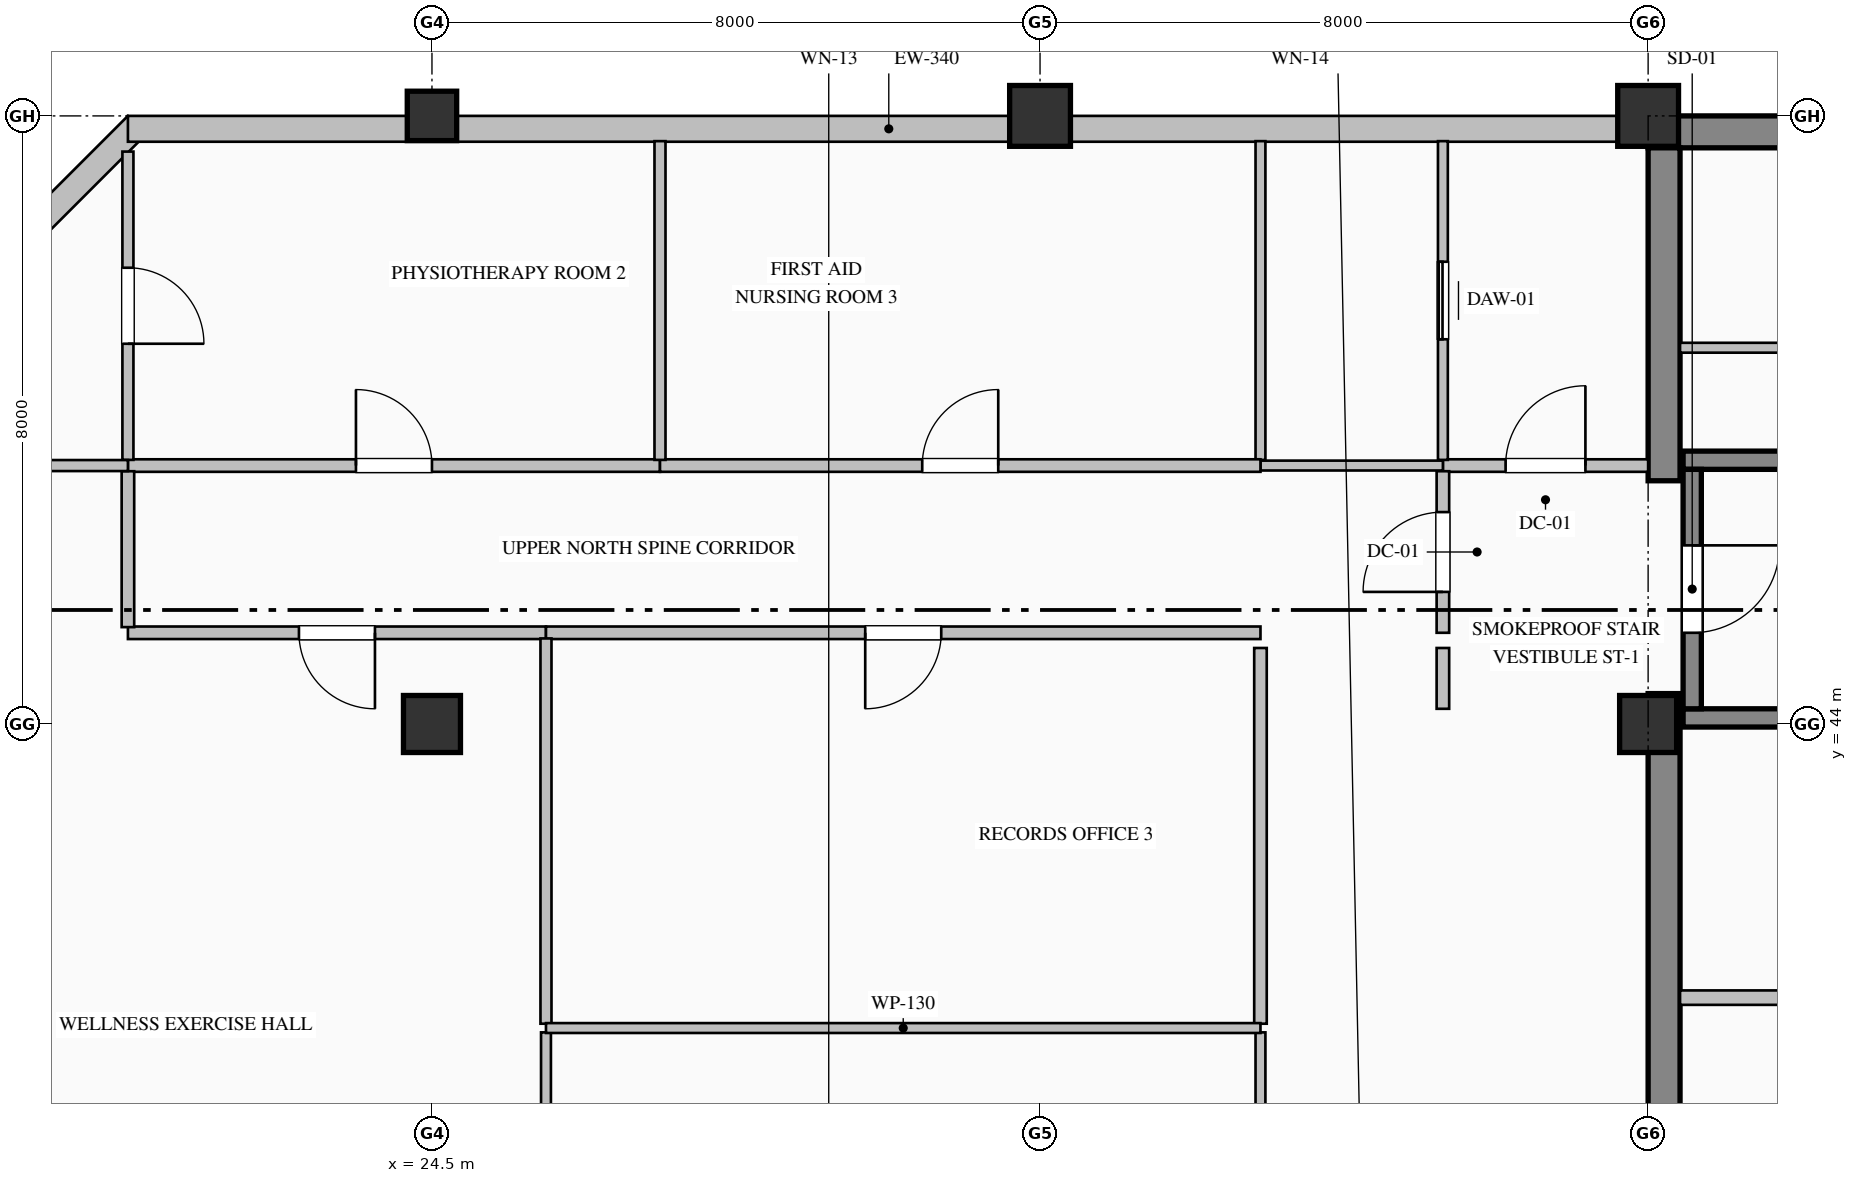
"""IFC4 building model, lengths in metres.
Left out: names, types, materials, properties, quantities, classifications, styles, units other than length and angle.
Written with IfcOpenShell. Run it as: python <this file> out.ifc"""

import sys

from ifc_helpers import new_model, si_unit, direction, frame, frame_2d, origin, origin_2d, place, context, subcontext, project, spatial, rectangle, hollow_rectangle, extrude, element, fill, save


model = new_model("IFC4")
c1 = context("Model", 3, precision=1e-05, world=origin(), true_north=direction((0.0, 1.0)))
c2 = subcontext(c1, "Body", "Model", "MODEL_VIEW")
j1 = project(units=[si_unit("LENGTHUNIT", "METRE"), si_unit("PLANEANGLEUNIT", "RADIAN")], contexts=[c1])
p1 = place(None, origin())
s1 = spatial("IfcSite", under=j1, at=p1, CompositionType="ELEMENT")
p2 = place(p1, origin())
s2 = spatial("IfcBuilding", under=s1, at=p2, CompositionType="ELEMENT")
p3 = place(p2, frame((0.0, 0.0, 347.2)))
s3 = spatial("IfcBuildingStorey", under=s2, at=p3, CompositionType="ELEMENT", Elevation=347.2)
p4 = place(p3, frame((40.5, 51.79, 0.0), z_axis=(0.0, 0.0, 1.0), x_axis=(1.0, 0.0, 0.0)))
e1 = element("IfcWall", 1, at=p4, inside=s3, PredefinedType="SHEAR", context=c2, shape_type="SweptSolid", body=[
    extrude(rectangle(XDim=23.5, YDim=0.42, at=frame_2d((11.75, 0.0))), origin(), (0.0, 0.0, 1.0), 3.785),
])
p5 = place(p3, frame((40.71, 36.42, 0.0), z_axis=(0.0, 0.0, 1.0), x_axis=(0.0, 1.0, 0.0)))
e2 = element("IfcWall", 2, at=p5, inside=s3, PredefinedType="SHEAR", context=c2, shape_type="SweptSolid", body=[
    extrude(rectangle(XDim=7.98, YDim=0.42, at=frame_2d((3.99, 0.0))), origin(), (0.0, 0.0, 1.0), 3.785),
])
p6 = place(p3, frame((40.71, 47.2, 0.0), z_axis=(0.0, 0.0, 1.0), x_axis=(0.0, 1.0, 0.0)))
e3 = element("IfcWall", 3, at=p6, inside=s3, PredefinedType="SHEAR", context=c2, shape_type="SweptSolid", body=[
    extrude(rectangle(XDim=4.38, YDim=0.42, at=frame_2d((2.19, 0.0))), origin(), (0.0, 0.0, 1.0), 3.785),
])
p7 = place(p3, frame((24.5, 44.0, 0.0), z_axis=(0.0, 0.0, 1.0), x_axis=(1.0, 0.0, 0.0)))
e4 = element("IfcColumn", 4, at=p7, inside=s3, PredefinedType="COLUMN", context=c2, shape_type="SweptSolid", body=[
    extrude(rectangle(XDim=0.75, YDim=0.75, at=origin_2d()), origin(), (0.0, 0.0, 1.0), 4.0),
])
p8 = place(p3, frame((24.5, 52.0, 0.0), z_axis=(0.0, 0.0, 1.0), x_axis=(1.0, 0.0, 0.0)))
e5 = element("IfcColumn", 5, at=p8, inside=s3, PredefinedType="COLUMN", context=c2, shape_type="SweptSolid", body=[
    extrude(hollow_rectangle(XDim=0.65, YDim=0.65, WallThickness=0.028, at=origin_2d()), origin(), (0.0, 0.0, 1.0), 4.0),
])
p9 = place(p3, frame((32.5, 52.0, 0.0), z_axis=(0.0, 0.0, 1.0), x_axis=(1.0, 0.0, 0.0)))
e6 = element("IfcColumn", 6, at=p9, inside=s3, PredefinedType="COLUMN", context=c2, shape_type="SweptSolid", body=[
    extrude(hollow_rectangle(XDim=0.8, YDim=0.8, WallThickness=0.032, at=origin_2d()), origin(), (0.0, 0.0, 1.0), 4.0),
])
p10 = place(p3, frame((40.5, 44.0, 0.0), z_axis=(0.0, 0.0, 1.0), x_axis=(1.0, 0.0, 0.0)))
e7 = element("IfcColumn", 7, at=p10, inside=s3, PredefinedType="COLUMN", context=c2, shape_type="SweptSolid", body=[
    extrude(rectangle(XDim=0.75, YDim=0.75, at=origin_2d()), origin(), (0.0, 0.0, 1.0), 4.0),
])
p11 = place(p3, frame((40.5, 52.0, 0.0), z_axis=(0.0, 0.0, 1.0), x_axis=(1.0, 0.0, 0.0)))
e8 = element("IfcColumn", 8, at=p11, inside=s3, PredefinedType="COLUMN", context=c2, shape_type="SweptSolid", body=[
    extrude(hollow_rectangle(XDim=0.8, YDim=0.8, WallThickness=0.032, at=origin_2d()), origin(), (0.0, 0.0, 1.0), 4.0),
])
p12 = place(p3, frame((16.62, 47.88, 0.0), z_axis=(0.0, 0.0, 1.0), x_axis=(0.707106781187, 0.707106781187, 0.0)))
e9 = element("IfcWall", 9, at=p12, inside=s3, PredefinedType="SOLIDWALL", context=c2, shape_type="SweptSolid", body=[
    extrude(rectangle(XDim=5.657, YDim=0.34, at=frame_2d((2.828, 0.0))), origin(), (0.0, 0.0, 1.0), 3.785),
])
p13 = place(p3, frame((20.5, 51.83, 0.0), z_axis=(0.0, 0.0, 1.0), x_axis=(1.0, 0.0, 0.0)))
e10 = element("IfcWall", 10, at=p13, inside=s3, PredefinedType="SOLIDWALL", context=c2, shape_type="SweptSolid", body=[
    extrude(rectangle(XDim=20.02, YDim=0.34, at=frame_2d((10.01, 0.0))), origin(), (0.0, 0.0, 1.0), 3.335),
])
for number, where, z_axis, x_axis in (
    (11, (40.96, 47.47, 0.0), (0.0, 0.0, 1.0), (1.0, 0.0, 0.0)),
    (12, (49.04, 44.08, 0.0), (0.0, 0.0, 1.0), (-1.0, 0.0, 0.0)),
):
    element("IfcWall", number, at=place(p3, frame(where, z_axis=z_axis, x_axis=x_axis)), inside=s3, PredefinedType="SOLIDWALL", context=c2, shape_type="SweptSolid", body=[
        extrude(rectangle(XDim=8.08, YDim=0.24, at=frame_2d((4.04, 0.0))), origin(), (0.0, 0.0, 1.0), 4.0),
    ])
p14 = place(p3, frame((41.08, 47.35, 0.0), z_axis=(0.0, 0.0, 1.0), x_axis=(0.0, -1.0, 0.0)))
e13 = element("IfcWall", 13, at=p14, inside=s3, PredefinedType="SOLIDWALL", context=c2, shape_type="SweptSolid", body=[
    extrude(rectangle(XDim=3.15, YDim=0.24, at=frame_2d((1.575, 0.0))), origin(), (0.0, 0.0, 1.0), 4.0),
])
p15 = place(p14, frame((1.0, 0.0, 0.0)))
e14 = element("IfcOpeningElement", 14, at=p15, cuts=e13, PredefinedType="OPENING", context=c2, shape_type="SweptSolid", body=[
    extrude(rectangle(XDim=1.15, YDim=2.2, at=frame_2d((0.575, 1.1))), frame((0.0, 0.13, 0.0), z_axis=(0.0, -1.0, 0.0), x_axis=(1.0, 0.0, 0.0)), (0.0, 0.0, 1.0), 0.26),
])
p16 = place(p3, frame((37.8, 47.4, 0.0), z_axis=(0.0, 0.0, 1.0), x_axis=(1.0, 0.0, 0.0)))
e15 = element("IfcWall", 15, at=p16, inside=s3, PredefinedType="PARTITIONING", context=c2, shape_type="SweptSolid", body=[
    extrude(rectangle(XDim=2.7, YDim=0.165, at=frame_2d((1.35, 0.0))), origin(), (0.0, 0.0, 1.0), 3.785),
])
p17 = place(p16, frame((0.825, 0.0, 0.0)))
e16 = element("IfcOpeningElement", 16, at=p17, cuts=e15, PredefinedType="OPENING", context=c2, shape_type="SweptSolid", body=[
    extrude(rectangle(XDim=1.05, YDim=2.15, at=frame_2d((0.525, 1.075))), frame((0.0, 0.093, 0.0), z_axis=(0.0, -1.0, 0.0), x_axis=(1.0, 0.0, 0.0)), (0.0, 0.0, 1.0), 0.185),
])
p18 = place(p3, frame((37.8, 45.2, 0.0), z_axis=(0.0, 0.0, 1.0), x_axis=(0.0, 1.0, 0.0)))
e17 = element("IfcWall", 17, at=p18, inside=s3, PredefinedType="PARTITIONING", context=c2, shape_type="SweptSolid", body=[
    extrude(rectangle(XDim=2.125, YDim=0.165, at=frame_2d((1.063, 0.0))), origin(), (0.0, 0.0, 1.0), 3.785),
])
p19 = place(p18, frame((0.538, 0.0, 0.0)))
e18 = element("IfcOpeningElement", 18, at=p19, cuts=e17, PredefinedType="OPENING", context=c2, shape_type="SweptSolid", body=[
    extrude(rectangle(XDim=1.05, YDim=2.15, at=frame_2d((0.525, 1.075))), frame((0.0, 0.093, 0.0), z_axis=(0.0, -1.0, 0.0), x_axis=(1.0, 0.0, 0.0)), (0.0, 0.0, 1.0), 0.185),
])
p20 = place(p3, frame((37.8, 44.2, 0.0), z_axis=(0.0, 0.0, 1.0), x_axis=(0.0, 1.0, 0.0)))
e19 = element("IfcWall", 19, at=p20, inside=s3, PredefinedType="PARTITIONING", context=c2, shape_type="SweptSolid", body=[
    extrude(rectangle(XDim=0.8, YDim=0.165, at=frame_2d((0.4, 0.0))), origin(), (0.0, 0.0, 1.0), 3.785),
])
p21 = place(p3, frame((37.8, 47.475, 0.0), z_axis=(0.0, 0.0, 1.0), x_axis=(0.0, 1.0, 0.0)))
e20 = element("IfcWall", 20, at=p21, inside=s3, PredefinedType="PARTITIONING", context=c2, shape_type="SweptSolid", body=[
    extrude(rectangle(XDim=4.193, YDim=0.13, at=frame_2d((2.097, 0.0))), origin(), (0.0, 0.0, 1.0), 3.785),
])
p22 = place(p21, frame((1.587, 0.0, 0.0)))
e21 = element("IfcOpeningElement", 21, at=p22, cuts=e20, PredefinedType="OPENING", context=c2, shape_type="SweptSolid", body=[
    extrude(rectangle(XDim=1.02, YDim=2.15, at=frame_2d((0.51, 1.075))), frame((0.0, 0.075, 0.0), z_axis=(0.0, -1.0, 0.0), x_axis=(1.0, 0.0, 0.0)), (0.0, 0.0, 1.0), 0.15),
])
p23 = place(p3, frame((37.8, 47.4, 0.0), z_axis=(0.0, 0.0, 1.0), x_axis=(-1.0, 0.0, 0.0)))
e22 = element("IfcWall", 22, at=p23, inside=s3, PredefinedType="PARTITIONING", context=c2, shape_type="SweptSolid", body=[
    extrude(rectangle(XDim=2.4, YDim=0.13, at=frame_2d((1.2, 0.0))), origin(), (0.0, 0.0, 1.0), 3.785),
])
p24 = place(p3, frame((35.4, 47.475, 0.0), z_axis=(0.0, 0.0, 1.0), x_axis=(0.0, 1.0, 0.0)))
e23 = element("IfcWall", 23, at=p24, inside=s3, PredefinedType="PARTITIONING", context=c2, shape_type="SweptSolid", body=[
    extrude(rectangle(XDim=4.193, YDim=0.13, at=frame_2d((2.097, 0.0))), origin(), (0.0, 0.0, 1.0), 3.785),
])
p25 = place(p3, frame((40.92, 48.95, 0.0), z_axis=(0.0, 0.0, 1.0), x_axis=(1.0, 0.0, 0.0)))
e24 = element("IfcWall", 24, at=p25, inside=s3, PredefinedType="PARTITIONING", context=c2, shape_type="SweptSolid", body=[
    extrude(rectangle(XDim=4.28, YDim=0.13, at=frame_2d((2.14, 0.0))), origin(), (0.0, 0.0, 1.0), 3.785),
])
p26 = place(p25, frame((1.68, 0.0, 0.0)))
e25 = element("IfcOpeningElement", 25, at=p26, cuts=e24, PredefinedType="OPENING", context=c2, shape_type="SweptSolid", body=[
    extrude(rectangle(XDim=0.92, YDim=2.15, at=frame_2d((0.46, 1.075))), frame((0.0, 0.075, 0.0), z_axis=(0.0, -1.0, 0.0), x_axis=(1.0, 0.0, 0.0)), (0.0, 0.0, 1.0), 0.15),
])
p27 = place(p3, frame((40.92, 40.4, 0.0), z_axis=(0.0, 0.0, 1.0), x_axis=(1.0, 0.0, 0.0)))
e26 = element("IfcWall", 26, at=p27, inside=s3, PredefinedType="PARTITIONING", context=c2, shape_type="SweptSolid", body=[
    extrude(rectangle(XDim=8.48, YDim=0.19, at=frame_2d((4.24, 0.0))), origin(), (0.0, 0.0, 1.0), 3.785),
])
p28 = place(p3, frame((20.5, 47.4, 0.0), z_axis=(0.0, 0.0, 1.0), x_axis=(1.0, 0.0, 0.0)))
e27 = element("IfcWall", 27, at=p28, inside=s3, PredefinedType="PARTITIONING", context=c2, shape_type="SweptSolid", body=[
    extrude(rectangle(XDim=7.0, YDim=0.165, at=frame_2d((3.5, 0.0))), origin(), (0.0, 0.0, 1.0), 3.785),
])
p29 = place(p28, frame((3.0, 0.0, 0.0)))
e28 = element("IfcOpeningElement", 28, at=p29, cuts=e27, PredefinedType="OPENING", context=c2, shape_type="SweptSolid", body=[
    extrude(rectangle(XDim=1.0, YDim=2.15, at=frame_2d((0.5, 1.075))), frame((0.0, 0.093, 0.0), z_axis=(0.0, -1.0, 0.0), x_axis=(1.0, 0.0, 0.0)), (0.0, 0.0, 1.0), 0.185),
])
p30 = place(p3, frame((27.5, 47.4, 0.0), z_axis=(0.0, 0.0, 1.0), x_axis=(1.0, 0.0, 0.0)))
e29 = element("IfcWall", 29, at=p30, inside=s3, PredefinedType="PARTITIONING", context=c2, shape_type="SweptSolid", body=[
    extrude(rectangle(XDim=7.9, YDim=0.165, at=frame_2d((3.95, 0.0))), origin(), (0.0, 0.0, 1.0), 3.785),
])
p31 = place(p30, frame((3.45, 0.0, 0.0)))
e30 = element("IfcOpeningElement", 30, at=p31, cuts=e29, PredefinedType="OPENING", context=c2, shape_type="SweptSolid", body=[
    extrude(rectangle(XDim=1.0, YDim=2.15, at=frame_2d((0.5, 1.075))), frame((0.0, 0.093, 0.0), z_axis=(0.0, -1.0, 0.0), x_axis=(1.0, 0.0, 0.0)), (0.0, 0.0, 1.0), 0.185),
])
p32 = place(p3, frame((26.0, 45.2, 0.0), z_axis=(0.0, 0.0, 1.0), x_axis=(-1.0, 0.0, 0.0)))
e31 = element("IfcWall", 31, at=p32, inside=s3, PredefinedType="PARTITIONING", context=c2, shape_type="SweptSolid", body=[
    extrude(rectangle(XDim=5.5, YDim=0.165, at=frame_2d((2.75, 0.0))), origin(), (0.0, 0.0, 1.0), 3.785),
])
p33 = place(p32, frame((2.25, 0.0, 0.0)))
e32 = element("IfcOpeningElement", 32, at=p33, cuts=e31, PredefinedType="OPENING", context=c2, shape_type="SweptSolid", body=[
    extrude(rectangle(XDim=1.0, YDim=2.15, at=frame_2d((0.5, 1.075))), frame((0.0, 0.093, 0.0), z_axis=(0.0, -1.0, 0.0), x_axis=(1.0, 0.0, 0.0)), (0.0, 0.0, 1.0), 0.185),
])
p34 = place(p3, frame((20.5, 45.274, 0.0), z_axis=(0.0, 0.0, 1.0), x_axis=(0.0, 1.0, 0.0)))
e33 = element("IfcWall", 33, at=p34, inside=s3, PredefinedType="PARTITIONING", context=c2, shape_type="SweptSolid", body=[
    extrude(rectangle(XDim=2.051, YDim=0.165, at=frame_2d((1.025, 0.0))), origin(), (0.0, 0.0, 1.0), 3.785),
])
p35 = place(p3, frame((35.4, 45.2, 0.0), z_axis=(0.0, 0.0, 1.0), x_axis=(-1.0, 0.0, 0.0)))
e34 = element("IfcWall", 34, at=p35, inside=s3, PredefinedType="PARTITIONING", context=c2, shape_type="SweptSolid", body=[
    extrude(rectangle(XDim=9.4, YDim=0.165, at=frame_2d((4.7, 0.0))), origin(), (0.0, 0.0, 1.0), 3.785),
])
p36 = place(p35, frame((4.2, 0.0, 0.0)))
e35 = element("IfcOpeningElement", 35, at=p36, cuts=e34, PredefinedType="OPENING", context=c2, shape_type="SweptSolid", body=[
    extrude(rectangle(XDim=1.0, YDim=2.15, at=frame_2d((0.5, 1.075))), frame((0.0, 0.093, 0.0), z_axis=(0.0, -1.0, 0.0), x_axis=(1.0, 0.0, 0.0)), (0.0, 0.0, 1.0), 0.185),
])
p37 = place(p3, frame((35.4, 34.057, 0.0), z_axis=(0.0, 0.0, 1.0), x_axis=(0.0, 1.0, 0.0)))
e36 = element("IfcWall", 36, at=p37, inside=s3, PredefinedType="PARTITIONING", context=c2, shape_type="SweptSolid", body=[
    extrude(rectangle(XDim=5.886, YDim=0.13, at=frame_2d((2.943, 0.0))), origin(), (0.0, 0.0, 1.0), 3.785),
])
p38 = place(p37, frame((2.443, 0.0, 0.0)))
e37 = element("IfcOpeningElement", 37, at=p38, cuts=e36, PredefinedType="OPENING", context=c2, shape_type="SweptSolid", body=[
    extrude(rectangle(XDim=1.0, YDim=2.15, at=frame_2d((0.5, 1.075))), frame((0.0, 0.075, 0.0), z_axis=(0.0, -1.0, 0.0), x_axis=(1.0, 0.0, 0.0)), (0.0, 0.0, 1.0), 0.15),
])
p39 = place(p3, frame((35.4, 40.057, 0.0), z_axis=(0.0, 0.0, 1.0), x_axis=(0.0, 1.0, 0.0)))
e38 = element("IfcWall", 38, at=p39, inside=s3, PredefinedType="PARTITIONING", context=c2, shape_type="SweptSolid", body=[
    extrude(rectangle(XDim=4.943, YDim=0.165, at=frame_2d((2.472, 0.0))), origin(), (0.0, 0.0, 1.0), 3.785),
])
p40 = place(p3, frame((20.5, 51.531, 0.0), z_axis=(0.0, 0.0, 1.0), x_axis=(0.0, -1.0, 0.0)))
e39 = element("IfcWall", 39, at=p40, inside=s3, PredefinedType="PARTITIONING", context=c2, shape_type="SweptSolid", body=[
    extrude(rectangle(XDim=4.056, YDim=0.145, at=frame_2d((2.028, 0.0))), origin(), (0.0, 0.0, 1.0), 3.785),
])
p41 = place(p40, frame((1.528, 0.0, 0.0)))
e40 = element("IfcOpeningElement", 40, at=p41, cuts=e39, PredefinedType="OPENING", context=c2, shape_type="SweptSolid", body=[
    extrude(rectangle(XDim=1.0, YDim=2.15, at=frame_2d((0.5, 1.075))), frame((0.0, 0.083, 0.0), z_axis=(0.0, -1.0, 0.0), x_axis=(1.0, 0.0, 0.0)), (0.0, 0.0, 1.0), 0.165),
])
p42 = place(p3, frame((20.5, 47.4, 0.0), z_axis=(0.0, 0.0, 1.0), x_axis=(-1.0, 0.0, 0.0)))
e41 = element("IfcWall", 41, at=p42, inside=s3, PredefinedType="PARTITIONING", context=c2, shape_type="SweptSolid", body=[
    extrude(rectangle(XDim=3.668, YDim=0.145, at=frame_2d((1.834, 0.0))), origin(), (0.0, 0.0, 1.0), 3.785),
])
p43 = place(p3, frame((27.5, 51.668, 0.0), z_axis=(0.0, 0.0, 1.0), x_axis=(0.0, -1.0, 0.0)))
e42 = element("IfcWall", 42, at=p43, inside=s3, PredefinedType="PARTITIONING", context=c2, shape_type="SweptSolid", body=[
    extrude(rectangle(XDim=4.193, YDim=0.145, at=frame_2d((2.097, 0.0))), origin(), (0.0, 0.0, 1.0), 3.785),
])
p44 = place(p3, frame((26.0, 39.943, 0.0), z_axis=(0.0, 0.0, 1.0), x_axis=(0.0, -1.0, 0.0)))
e43 = element("IfcWall", 43, at=p44, inside=s3, PredefinedType="PARTITIONING", context=c2, shape_type="SweptSolid", body=[
    extrude(rectangle(XDim=5.886, YDim=0.13, at=frame_2d((2.943, 0.0))), origin(), (0.0, 0.0, 1.0), 3.785),
])
p45 = place(p3, frame((26.0, 45.125, 0.0), z_axis=(0.0, 0.0, 1.0), x_axis=(0.0, -1.0, 0.0)))
e44 = element("IfcWall", 44, at=p45, inside=s3, PredefinedType="PARTITIONING", context=c2, shape_type="SweptSolid", body=[
    extrude(rectangle(XDim=5.069, YDim=0.145, at=frame_2d((2.534, 0.0))), origin(), (0.0, 0.0, 1.0), 3.785),
])
p46 = place(p3, frame((26.0, 40.0, 0.0), z_axis=(0.0, 0.0, 1.0), x_axis=(1.0, 0.0, 0.0)))
e45 = element("IfcWall", 45, at=p46, inside=s3, PredefinedType="PARTITIONING", context=c2, shape_type="SweptSolid", body=[
    extrude(rectangle(XDim=9.4, YDim=0.13, at=frame_2d((4.7, 0.0))), origin(), (0.0, 0.0, 1.0), 3.785),
])
p47 = place(p15, origin())
e46 = element("IfcDoor", 46, at=p47, inside=s3, OperationType="SINGLE_SWING_LEFT", PredefinedType="DOOR", context=c2, shape_type="SweptSolid", body=[
    extrude(rectangle(XDim=1.15, YDim=2.2, at=frame_2d((0.575, 1.1))), frame((0.0, 0.025, 0.0), z_axis=(0.0, -1.0, 0.0), x_axis=(1.0, 0.0, 0.0)), (0.0, 0.0, 1.0), 0.05),
])
fill(e14, e46)
p48 = place(p17, origin())
e47 = element("IfcDoor", 47, at=p48, inside=s3, OperationType="SINGLE_SWING_RIGHT", PredefinedType="DOOR", context=c2, shape_type="SweptSolid", body=[
    extrude(rectangle(XDim=1.05, YDim=2.15, at=frame_2d((0.525, 1.075))), frame((0.0, 0.025, 0.0), z_axis=(0.0, -1.0, 0.0), x_axis=(1.0, 0.0, 0.0)), (0.0, 0.0, 1.0), 0.05),
])
fill(e16, e47)
p49 = place(p19, origin())
e48 = element("IfcDoor", 48, at=p49, inside=s3, OperationType="SINGLE_SWING_LEFT", PredefinedType="DOOR", context=c2, shape_type="SweptSolid", body=[
    extrude(rectangle(XDim=1.05, YDim=2.15, at=frame_2d((0.525, 1.075))), frame((0.0, 0.025, 0.0), z_axis=(0.0, -1.0, 0.0), x_axis=(1.0, 0.0, 0.0)), (0.0, 0.0, 1.0), 0.05),
])
fill(e18, e48)
p50 = place(p22, origin())
e49 = element("IfcDoor", 49, at=p50, inside=s3, OperationType="SLIDING_TO_LEFT", PredefinedType="DOOR", context=c2, shape_type="SweptSolid", body=[
    extrude(rectangle(XDim=1.02, YDim=2.15, at=frame_2d((0.51, 1.075))), frame((0.0, 0.025, 0.0), z_axis=(0.0, -1.0, 0.0), x_axis=(1.0, 0.0, 0.0)), (0.0, 0.0, 1.0), 0.05),
])
fill(e21, e49)
p51 = place(p41, origin())
e50 = element("IfcDoor", 50, at=p51, inside=s3, OperationType="SINGLE_SWING_RIGHT", PredefinedType="DOOR", context=c2, shape_type="SweptSolid", body=[
    extrude(rectangle(XDim=1.0, YDim=2.15, at=frame_2d((0.5, 1.075))), frame((0.0, 0.025, 0.0), z_axis=(0.0, -1.0, 0.0), x_axis=(1.0, 0.0, 0.0)), (0.0, 0.0, 1.0), 0.05),
])
fill(e40, e50)
p52 = place(p29, origin())
e51 = element("IfcDoor", 51, at=p52, inside=s3, OperationType="SINGLE_SWING_LEFT", PredefinedType="DOOR", context=c2, shape_type="SweptSolid", body=[
    extrude(rectangle(XDim=1.0, YDim=2.15, at=frame_2d((0.5, 1.075))), frame((0.0, 0.025, 0.0), z_axis=(0.0, -1.0, 0.0), x_axis=(1.0, 0.0, 0.0)), (0.0, 0.0, 1.0), 0.05),
])
fill(e28, e51)
p53 = place(p31, origin())
e52 = element("IfcDoor", 52, at=p53, inside=s3, OperationType="SINGLE_SWING_RIGHT", PredefinedType="DOOR", context=c2, shape_type="SweptSolid", body=[
    extrude(rectangle(XDim=1.0, YDim=2.15, at=frame_2d((0.5, 1.075))), frame((0.0, 0.025, 0.0), z_axis=(0.0, -1.0, 0.0), x_axis=(1.0, 0.0, 0.0)), (0.0, 0.0, 1.0), 0.05),
])
fill(e30, e52)
p54 = place(p33, origin())
e53 = element("IfcDoor", 53, at=p54, inside=s3, OperationType="SINGLE_SWING_LEFT", PredefinedType="DOOR", context=c2, shape_type="SweptSolid", body=[
    extrude(rectangle(XDim=1.0, YDim=2.15, at=frame_2d((0.5, 1.075))), frame((0.0, 0.025, 0.0), z_axis=(0.0, -1.0, 0.0), x_axis=(1.0, 0.0, 0.0)), (0.0, 0.0, 1.0), 0.05),
])
fill(e32, e53)
p55 = place(p36, origin())
e54 = element("IfcDoor", 54, at=p55, inside=s3, OperationType="SINGLE_SWING_RIGHT", PredefinedType="DOOR", context=c2, shape_type="SweptSolid", body=[
    extrude(rectangle(XDim=1.0, YDim=2.15, at=frame_2d((0.5, 1.075))), frame((0.0, 0.025, 0.0), z_axis=(0.0, -1.0, 0.0), x_axis=(1.0, 0.0, 0.0)), (0.0, 0.0, 1.0), 0.05),
])
fill(e35, e54)
save(model, sys.argv[1])
